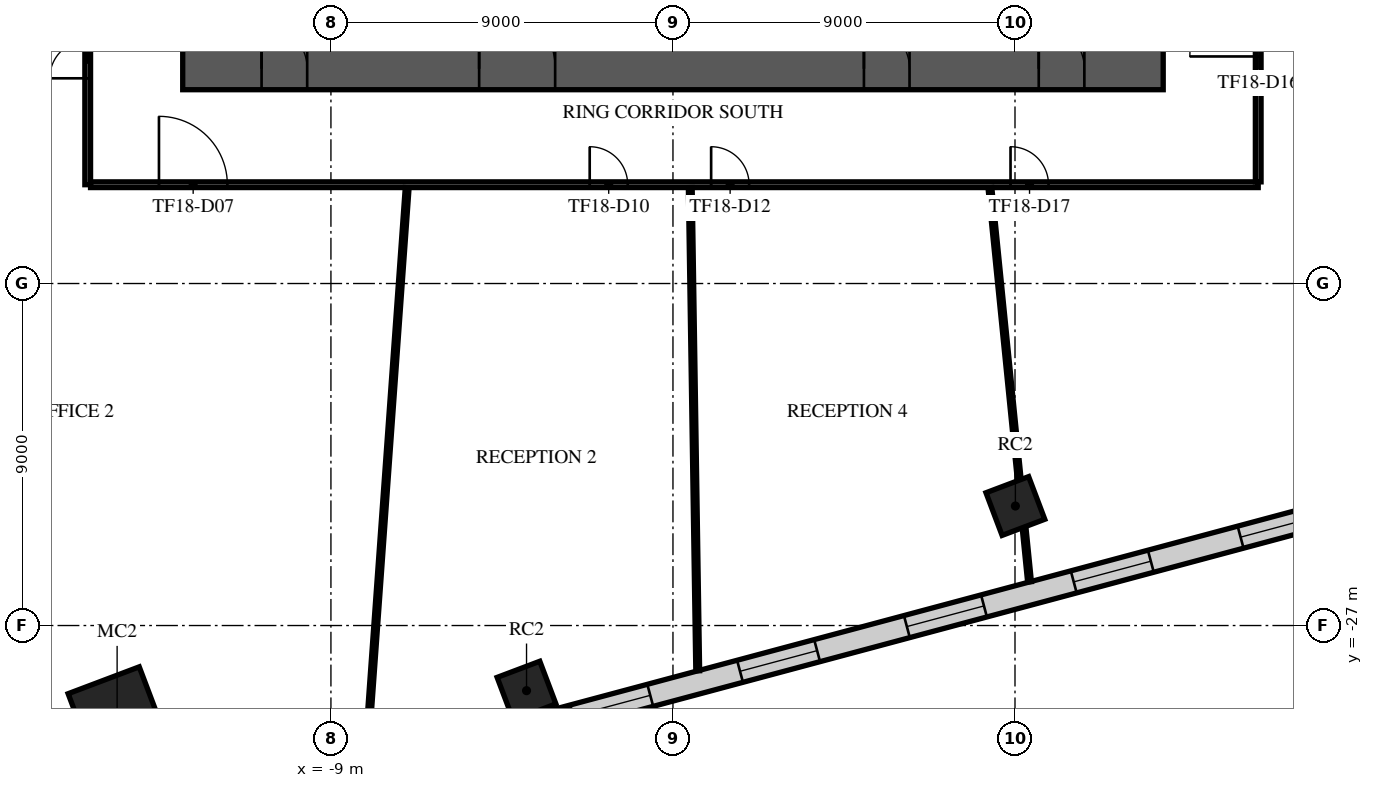
"""IFC4 building model, lengths in metres.
Left out: names, types, materials, properties, quantities, classifications, styles, units other than length and angle.
Written with IfcOpenShell. Run it as: python <this file> out.ifc"""

import sys

from ifc_helpers import new_model, si_unit, direction, frame, frame_2d, origin, origin_2d, place, context, subcontext, project, spatial, rectangle, extrude, element, fill, save


model = new_model("IFC4")
c1 = context("Model", 3, precision=1e-05, world=origin(), true_north=direction((0.0, 1.0)))
c2 = subcontext(c1, "Body", "Model", "MODEL_VIEW")
j1 = project(units=[si_unit("LENGTHUNIT", "METRE"), si_unit("PLANEANGLEUNIT", "RADIAN")], contexts=[c1])
p1 = place(None, origin())
s1 = spatial("IfcSite", under=j1, at=p1, CompositionType="ELEMENT")
p2 = place(p1, origin())
s2 = spatial("IfcBuilding", under=s1, at=p2, CompositionType="ELEMENT")
p3 = place(p2, frame((0.0, 0.0, 82.1)))
s3 = spatial("IfcBuildingStorey", under=s2, at=p3, CompositionType="ELEMENT", Elevation=82.1)
p4 = place(p3, frame((-14.626, -29.376, -0.42), z_axis=(0.0, 0.0, 1.0), x_axis=(0.935491525991, 0.353349125935, 0.0)))
e1 = element("IfcColumn", 1, at=p4, inside=s3, PredefinedType="COLUMN", context=c2, shape_type="SweptSolid", body=[
    extrude(rectangle(XDim=2.0, YDim=2.0, at=origin_2d()), origin(), (0.0, 0.0, 1.0), 4.42),
])
for number, where, z_axis, x_axis in (
    (2, (-3.853, -28.714, -0.42), (0.0, 0.0, 1.0), (0.935, 0.353, 0.0)),
    (3, (9.01, -23.855, -0.42), (0.0, 0.0, 1.0), (0.935, 0.353, 0.0)),
):
    element("IfcColumn", number, at=place(p3, frame(where, z_axis=z_axis, x_axis=x_axis)), inside=s3, PredefinedType="COLUMN", context=c2, shape_type="SweptSolid", body=[
        extrude(rectangle(XDim=1.2, YDim=1.2, at=origin_2d()), origin(), (0.0, 0.0, 1.0), 4.42),
    ])
p5 = place(p3, frame((-12.9, -12.35, 0.0), z_axis=(0.0, 0.0, 1.0), x_axis=(1.0, 0.0, 0.0)))
e4 = element("IfcWall", 4, at=p5, inside=s3, PredefinedType="SHEAR", context=c2, shape_type="SweptSolid", body=[
    extrude(rectangle(XDim=25.8, YDim=1.1, at=frame_2d((12.9, 0.0))), origin(), (0.0, 0.0, 1.0), 3.58),
])
p6 = place(p5, frame((7.8, 0.0, 0.0)))
e5 = element("IfcOpeningElement", 5, at=p6, cuts=e4, PredefinedType="OPENING", context=c2, shape_type="SweptSolid", body=[
    extrude(rectangle(XDim=2.0, YDim=2.1, at=frame_2d((1.0, 1.05))), frame((0.0, 0.56, 0.0), z_axis=(0.0, -1.0, 0.0), x_axis=(1.0, 0.0, 0.0)), (0.0, 0.0, 1.0), 1.12),
])
p7 = place(p5, frame((17.925, 0.0, 0.0)))
e6 = element("IfcOpeningElement", 6, at=p7, cuts=e4, PredefinedType="OPENING", context=c2, shape_type="SweptSolid", body=[
    extrude(rectangle(XDim=1.2, YDim=2.1, at=frame_2d((0.6, 1.05))), frame((0.0, 0.56, 0.0), z_axis=(0.0, -1.0, 0.0), x_axis=(1.0, 0.0, 0.0)), (0.0, 0.0, 1.0), 1.12),
])
p8 = place(p5, frame((2.075, 0.0, 0.0)))
e7 = element("IfcOpeningElement", 7, at=p8, cuts=e4, PredefinedType="OPENING", context=c2, shape_type="SweptSolid", body=[
    extrude(rectangle(XDim=1.2, YDim=2.1, at=frame_2d((0.6, 1.05))), frame((0.0, 0.56, 0.0), z_axis=(0.0, -1.0, 0.0), x_axis=(1.0, 0.0, 0.0)), (0.0, 0.0, 1.0), 1.12),
])
p9 = place(p5, frame((22.525, 0.0, 0.0)))
e8 = element("IfcOpeningElement", 8, at=p9, cuts=e4, PredefinedType="OPENING", context=c2, shape_type="SweptSolid", body=[
    extrude(rectangle(XDim=1.2, YDim=2.1, at=frame_2d((0.6, 1.05))), frame((0.0, 0.56, 0.0), z_axis=(0.0, -1.0, 0.0), x_axis=(1.0, 0.0, 0.0)), (0.0, 0.0, 1.0), 1.12),
])
p10 = place(p3, frame((-16.859, -33.195, 0.0), z_axis=(0.0, 0.0, 1.0), x_axis=(0.965925643605, 0.258819726887, 0.0)))
e9 = element("IfcWall", 9, at=p10, inside=s3, PredefinedType="STANDARD", context=c2, shape_type="SweptSolid", body=[
    extrude(rectangle(XDim=49.752, YDim=0.6, at=frame_2d((24.876, 0.0))), origin(), (0.0, 0.0, 1.0), 3.58),
])
p11 = place(p10, frame((1.161, 0.0, 0.9)))
e10 = element("IfcOpeningElement", 10, at=p11, cuts=e9, PredefinedType="OPENING", context=c2, shape_type="SweptSolid", body=[
    extrude(rectangle(XDim=2.1, YDim=2.1, at=frame_2d((1.05, 1.05))), frame((0.0, 0.31, 0.0), z_axis=(0.0, -1.0, 0.0), x_axis=(1.0, 0.0, 0.0)), (0.0, 0.0, 1.0), 0.62),
])
p12 = place(p10, frame((5.644, 0.0, 0.9)))
e11 = element("IfcOpeningElement", 11, at=p12, cuts=e9, PredefinedType="OPENING", context=c2, shape_type="SweptSolid", body=[
    extrude(rectangle(XDim=2.1, YDim=2.1, at=frame_2d((1.05, 1.05))), frame((0.0, 0.31, 0.0), z_axis=(0.0, -1.0, 0.0), x_axis=(1.0, 0.0, 0.0)), (0.0, 0.0, 1.0), 0.62),
])
p13 = place(p10, frame((10.189, 0.0, 0.9)))
e12 = element("IfcOpeningElement", 12, at=p13, cuts=e9, PredefinedType="OPENING", context=c2, shape_type="SweptSolid", body=[
    extrude(rectangle(XDim=2.1, YDim=2.1, at=frame_2d((1.05, 1.05))), frame((0.0, 0.31, 0.0), z_axis=(0.0, -1.0, 0.0), x_axis=(1.0, 0.0, 0.0)), (0.0, 0.0, 1.0), 0.62),
])
p14 = place(p10, frame((14.735, 0.0, 0.9)))
e13 = element("IfcOpeningElement", 13, at=p14, cuts=e9, PredefinedType="OPENING", context=c2, shape_type="SweptSolid", body=[
    extrude(rectangle(XDim=2.1, YDim=2.1, at=frame_2d((1.05, 1.05))), frame((0.0, 0.31, 0.0), z_axis=(0.0, -1.0, 0.0), x_axis=(1.0, 0.0, 0.0)), (0.0, 0.0, 1.0), 0.62),
])
p15 = place(p10, frame((19.28, 0.0, 0.9)))
e14 = element("IfcOpeningElement", 14, at=p15, cuts=e9, PredefinedType="OPENING", context=c2, shape_type="SweptSolid", body=[
    extrude(rectangle(XDim=2.1, YDim=2.1, at=frame_2d((1.05, 1.05))), frame((0.0, 0.31, 0.0), z_axis=(0.0, -1.0, 0.0), x_axis=(1.0, 0.0, 0.0)), (0.0, 0.0, 1.0), 0.62),
])
p16 = place(p10, frame((23.826, 0.0, 0.9)))
e15 = element("IfcOpeningElement", 15, at=p16, cuts=e9, PredefinedType="OPENING", context=c2, shape_type="SweptSolid", body=[
    extrude(rectangle(XDim=2.1, YDim=2.1, at=frame_2d((1.05, 1.05))), frame((0.0, 0.31, 0.0), z_axis=(0.0, -1.0, 0.0), x_axis=(1.0, 0.0, 0.0)), (0.0, 0.0, 1.0), 0.62),
])
p17 = place(p10, frame((28.371, 0.0, 0.9)))
e16 = element("IfcOpeningElement", 16, at=p17, cuts=e9, PredefinedType="OPENING", context=c2, shape_type="SweptSolid", body=[
    extrude(rectangle(XDim=2.1, YDim=2.1, at=frame_2d((1.05, 1.05))), frame((0.0, 0.31, 0.0), z_axis=(0.0, -1.0, 0.0), x_axis=(1.0, 0.0, 0.0)), (0.0, 0.0, 1.0), 0.62),
])
p18 = place(p10, frame((32.917, 0.0, 0.9)))
e17 = element("IfcOpeningElement", 17, at=p18, cuts=e9, PredefinedType="OPENING", context=c2, shape_type="SweptSolid", body=[
    extrude(rectangle(XDim=2.1, YDim=2.1, at=frame_2d((1.05, 1.05))), frame((0.0, 0.31, 0.0), z_axis=(0.0, -1.0, 0.0), x_axis=(1.0, 0.0, 0.0)), (0.0, 0.0, 1.0), 0.62),
])
p19 = place(p10, frame((37.462, 0.0, 0.9)))
e18 = element("IfcOpeningElement", 18, at=p19, cuts=e9, PredefinedType="OPENING", context=c2, shape_type="SweptSolid", body=[
    extrude(rectangle(XDim=2.1, YDim=2.1, at=frame_2d((1.05, 1.05))), frame((0.0, 0.31, 0.0), z_axis=(0.0, -1.0, 0.0), x_axis=(1.0, 0.0, 0.0)), (0.0, 0.0, 1.0), 0.62),
])
p20 = place(p10, frame((42.008, 0.0, 0.9)))
e19 = element("IfcOpeningElement", 19, at=p20, cuts=e9, PredefinedType="OPENING", context=c2, shape_type="SweptSolid", body=[
    extrude(rectangle(XDim=2.1, YDim=2.1, at=frame_2d((1.05, 1.05))), frame((0.0, 0.31, 0.0), z_axis=(0.0, -1.0, 0.0), x_axis=(1.0, 0.0, 0.0)), (0.0, 0.0, 1.0), 0.62),
])
p21 = place(p10, frame((46.491, 0.0, 0.9)))
e20 = element("IfcOpeningElement", 20, at=p21, cuts=e9, PredefinedType="OPENING", context=c2, shape_type="SweptSolid", body=[
    extrude(rectangle(XDim=2.1, YDim=2.1, at=frame_2d((1.05, 1.05))), frame((0.0, 0.31, 0.0), z_axis=(0.0, -1.0, 0.0), x_axis=(1.0, 0.0, 0.0)), (0.0, 0.0, 1.0), 0.62),
])
p22 = place(p3, frame((-15.4, -15.4, 0.0), z_axis=(0.0, 0.0, 1.0), x_axis=(0.0, 1.0, 0.0)))
e21 = element("IfcWall", 21, at=p22, inside=s3, PredefinedType="PARTITIONING", context=c2, shape_type="SweptSolid", body=[
    extrude(rectangle(XDim=30.8, YDim=0.15, at=frame_2d((15.4, 0.0))), origin(), (0.0, 0.0, 1.0), 3.08),
])
p23 = place(p22, frame((21.677, 0.0, 0.0)))
e22 = element("IfcOpeningElement", 22, at=p23, cuts=e21, PredefinedType="OPENING", context=c2, shape_type="SweptSolid", body=[
    extrude(rectangle(XDim=1.8, YDim=2.1, at=frame_2d((0.9, 1.05))), frame((0.0, 0.085, 0.0), z_axis=(0.0, -1.0, 0.0), x_axis=(1.0, 0.0, 0.0)), (0.0, 0.0, 1.0), 0.17),
])
p24 = place(p22, frame((17.927, 0.0, 0.0)))
e23 = element("IfcOpeningElement", 23, at=p24, cuts=e21, PredefinedType="OPENING", context=c2, shape_type="SweptSolid", body=[
    extrude(rectangle(XDim=1.0, YDim=2.1, at=frame_2d((0.5, 1.05))), frame((0.0, 0.085, 0.0), z_axis=(0.0, -1.0, 0.0), x_axis=(1.0, 0.0, 0.0)), (0.0, 0.0, 1.0), 0.17),
])
p25 = place(p22, frame((15.322, 0.0, 0.0)))
e24 = element("IfcOpeningElement", 24, at=p25, cuts=e21, PredefinedType="OPENING", context=c2, shape_type="SweptSolid", body=[
    extrude(rectangle(XDim=1.0, YDim=2.1, at=frame_2d((0.5, 1.05))), frame((0.0, 0.085, 0.0), z_axis=(0.0, -1.0, 0.0), x_axis=(1.0, 0.0, 0.0)), (0.0, 0.0, 1.0), 0.17),
])
p26 = place(p22, frame((6.348, 0.0, 0.0)))
e25 = element("IfcOpeningElement", 25, at=p26, cuts=e21, PredefinedType="OPENING", context=c2, shape_type="SweptSolid", body=[
    extrude(rectangle(XDim=1.0, YDim=2.1, at=frame_2d((0.5, 1.05))), frame((0.0, 0.085, 0.0), z_axis=(0.0, -1.0, 0.0), x_axis=(1.0, 0.0, 0.0)), (0.0, 0.0, 1.0), 0.17),
])
p27 = place(p22, frame((27.605, 0.0, 0.0)))
e26 = element("IfcOpeningElement", 26, at=p27, cuts=e21, PredefinedType="OPENING", context=c2, shape_type="SweptSolid", body=[
    extrude(rectangle(XDim=1.0, YDim=2.1, at=frame_2d((0.5, 1.05))), frame((0.0, 0.085, 0.0), z_axis=(0.0, -1.0, 0.0), x_axis=(1.0, 0.0, 0.0)), (0.0, 0.0, 1.0), 0.17),
])
p28 = place(p22, frame((2.8, 0.0, 0.0)))
e27 = element("IfcOpeningElement", 27, at=p28, cuts=e21, PredefinedType="OPENING", context=c2, shape_type="SweptSolid", body=[
    extrude(rectangle(XDim=1.0, YDim=2.1, at=frame_2d((0.5, 1.05))), frame((0.0, 0.085, 0.0), z_axis=(0.0, -1.0, 0.0), x_axis=(1.0, 0.0, 0.0)), (0.0, 0.0, 1.0), 0.17),
])
p29 = place(p3, frame((-15.325, -15.4, 0.0), z_axis=(0.0, 0.0, 1.0), x_axis=(1.0, 0.0, 0.0)))
e28 = element("IfcWall", 28, at=p29, inside=s3, PredefinedType="PARTITIONING", context=c2, shape_type="SweptSolid", body=[
    extrude(rectangle(XDim=30.725, YDim=0.15, at=frame_2d((15.362, 0.0))), origin(), (0.0, 0.0, 1.0), 3.08),
])
p30 = place(p29, frame((1.8, 0.0, 0.0)))
e29 = element("IfcOpeningElement", 29, at=p30, cuts=e28, PredefinedType="OPENING", context=c2, shape_type="SweptSolid", body=[
    extrude(rectangle(XDim=1.8, YDim=2.1, at=frame_2d((0.9, 1.05))), frame((0.0, 0.085, 0.0), z_axis=(0.0, -1.0, 0.0), x_axis=(1.0, 0.0, 0.0)), (0.0, 0.0, 1.0), 0.17),
])
p31 = place(p29, frame((13.134, 0.0, 0.0)))
e30 = element("IfcOpeningElement", 30, at=p31, cuts=e28, PredefinedType="OPENING", context=c2, shape_type="SweptSolid", body=[
    extrude(rectangle(XDim=1.0, YDim=2.1, at=frame_2d((0.5, 1.05))), frame((0.0, 0.085, 0.0), z_axis=(0.0, -1.0, 0.0), x_axis=(1.0, 0.0, 0.0)), (0.0, 0.0, 1.0), 0.17),
])
p32 = place(p29, frame((16.329, 0.0, 0.0)))
e31 = element("IfcOpeningElement", 31, at=p32, cuts=e28, PredefinedType="OPENING", context=c2, shape_type="SweptSolid", body=[
    extrude(rectangle(XDim=1.0, YDim=2.1, at=frame_2d((0.5, 1.05))), frame((0.0, 0.085, 0.0), z_axis=(0.0, -1.0, 0.0), x_axis=(1.0, 0.0, 0.0)), (0.0, 0.0, 1.0), 0.17),
])
p33 = place(p29, frame((24.208, 0.0, 0.0)))
e32 = element("IfcOpeningElement", 32, at=p33, cuts=e28, PredefinedType="OPENING", context=c2, shape_type="SweptSolid", body=[
    extrude(rectangle(XDim=1.0, YDim=2.1, at=frame_2d((0.5, 1.05))), frame((0.0, 0.085, 0.0), z_axis=(0.0, -1.0, 0.0), x_axis=(1.0, 0.0, 0.0)), (0.0, 0.0, 1.0), 0.17),
])
p34 = place(p3, frame((15.4, -15.325, 0.0), z_axis=(0.0, 0.0, 1.0), x_axis=(0.0, 1.0, 0.0)))
e33 = element("IfcWall", 33, at=p34, inside=s3, PredefinedType="PARTITIONING", context=c2, shape_type="SweptSolid", body=[
    extrude(rectangle(XDim=30.65, YDim=0.15, at=frame_2d((15.325, 0.0))), origin(), (0.0, 0.0, 1.0), 3.08),
])
p35 = place(p34, frame((24.14, 0.0, 0.0)))
e34 = element("IfcOpeningElement", 34, at=p35, cuts=e33, PredefinedType="OPENING", context=c2, shape_type="SweptSolid", body=[
    extrude(rectangle(XDim=1.8, YDim=2.1, at=frame_2d((0.9, 1.05))), frame((0.0, 0.085, 0.0), z_axis=(0.0, -1.0, 0.0), x_axis=(1.0, 0.0, 0.0)), (0.0, 0.0, 1.0), 0.17),
])
p36 = place(p34, frame((3.3, 0.0, 0.0)))
e35 = element("IfcOpeningElement", 35, at=p36, cuts=e33, PredefinedType="OPENING", context=c2, shape_type="SweptSolid", body=[
    extrude(rectangle(XDim=1.8, YDim=2.1, at=frame_2d((0.9, 1.05))), frame((0.0, 0.085, 0.0), z_axis=(0.0, -1.0, 0.0), x_axis=(1.0, 0.0, 0.0)), (0.0, 0.0, 1.0), 0.17),
])
p37 = place(p34, frame((19.191, 0.0, 0.0)))
e36 = element("IfcOpeningElement", 36, at=p37, cuts=e33, PredefinedType="OPENING", context=c2, shape_type="SweptSolid", body=[
    extrude(rectangle(XDim=1.0, YDim=2.1, at=frame_2d((0.5, 1.05))), frame((0.0, 0.085, 0.0), z_axis=(0.0, -1.0, 0.0), x_axis=(1.0, 0.0, 0.0)), (0.0, 0.0, 1.0), 0.17),
])
p38 = place(p34, frame((10.963, 0.0, 0.0)))
e37 = element("IfcOpeningElement", 37, at=p38, cuts=e33, PredefinedType="OPENING", context=c2, shape_type="SweptSolid", body=[
    extrude(rectangle(XDim=1.0, YDim=2.1, at=frame_2d((0.5, 1.05))), frame((0.0, 0.085, 0.0), z_axis=(0.0, -1.0, 0.0), x_axis=(1.0, 0.0, 0.0)), (0.0, 0.0, 1.0), 0.17),
])
p39 = place(p3, frame((-27.178, -12.154, 0.0), z_axis=(0.0, 0.0, 1.0), x_axis=(0.996016470741, 0.089169445512, 0.0)))
e38 = element("IfcWall", 38, at=p39, inside=s3, PredefinedType="PARTITIONING", context=c2, shape_type="SweptSolid", body=[
    extrude(rectangle(XDim=11.746, YDim=0.1, at=frame_2d((5.873, 0.0))), origin(), (0.0, 0.0, 1.0), 3.58),
])
p40 = place(p3, frame((-8.074, -30.528, 0.0), z_axis=(0.0, 0.0, 1.0), x_axis=(0.071616164184, 0.997432265885, 0.0)))
e39 = element("IfcWall", 39, at=p40, inside=s3, PredefinedType="PARTITIONING", context=c2, shape_type="SweptSolid", body=[
    extrude(rectangle(XDim=15.088, YDim=0.1, at=frame_2d((7.544, 0.0))), origin(), (0.0, 0.0, 1.0), 3.58),
])
p41 = place(p3, frame((0.455, -15.476, 0.0), z_axis=(0.0, 0.0, 1.0), x_axis=(0.015436837746, -0.999880844921, 0.0)))
e40 = element("IfcWall", 40, at=p41, inside=s3, PredefinedType="PARTITIONING", context=c2, shape_type="SweptSolid", body=[
    extrude(rectangle(XDim=12.716, YDim=0.1, at=frame_2d((6.358, 0.0))), origin(), (0.0, 0.0, 1.0), 3.58),
])
p42 = place(p3, frame((8.34, -15.48, 0.0), z_axis=(0.0, 0.0, 1.0), x_axis=(0.09998194497, -0.99498925154, 0.0)))
e41 = element("IfcWall", 41, at=p42, inside=s3, PredefinedType="PARTITIONING", context=c2, shape_type="SweptSolid", body=[
    extrude(rectangle(XDim=7.733, YDim=0.1, at=frame_2d((3.867, 0.0))), origin(), (0.0, 0.0, 1.0), 2.96),
])
p43 = place(p3, frame((9.237, -24.41, 0.0), z_axis=(0.0, 0.0, 1.0), x_axis=(0.100021406051, -0.994985285485, 0.0)))
e42 = element("IfcWall", 42, at=p43, inside=s3, PredefinedType="PARTITIONING", context=c2, shape_type="SweptSolid", body=[
    extrude(rectangle(XDim=1.448, YDim=0.1, at=frame_2d((0.724, 0.0))), origin(), (0.0, 0.0, 1.0), 3.58),
])
p44 = place(p6, origin())
e43 = element("IfcDoor", 43, at=p44, inside=s3, OperationType="SINGLE_SWING_LEFT", PredefinedType="DOOR", context=c2, shape_type="SweptSolid", body=[
    extrude(rectangle(XDim=2.0, YDim=2.1, at=frame_2d((1.0, 1.05))), frame((0.0, 0.025, 0.0), z_axis=(0.0, -1.0, 0.0), x_axis=(1.0, 0.0, 0.0)), (0.0, 0.0, 1.0), 0.05),
])
fill(e5, e43)
p45 = place(p7, origin())
e44 = element("IfcDoor", 44, at=p45, inside=s3, OperationType="SINGLE_SWING_LEFT", PredefinedType="DOOR", context=c2, shape_type="SweptSolid", body=[
    extrude(rectangle(XDim=1.2, YDim=2.1, at=frame_2d((0.6, 1.05))), frame((0.0, 0.025, 0.0), z_axis=(0.0, -1.0, 0.0), x_axis=(1.0, 0.0, 0.0)), (0.0, 0.0, 1.0), 0.05),
])
fill(e6, e44)
p46 = place(p8, origin())
e45 = element("IfcDoor", 45, at=p46, inside=s3, OperationType="SINGLE_SWING_LEFT", PredefinedType="DOOR", context=c2, shape_type="SweptSolid", body=[
    extrude(rectangle(XDim=1.2, YDim=2.1, at=frame_2d((0.6, 1.05))), frame((0.0, 0.025, 0.0), z_axis=(0.0, -1.0, 0.0), x_axis=(1.0, 0.0, 0.0)), (0.0, 0.0, 1.0), 0.05),
])
fill(e7, e45)
p47 = place(p9, origin())
e46 = element("IfcDoor", 46, at=p47, inside=s3, OperationType="SINGLE_SWING_LEFT", PredefinedType="DOOR", context=c2, shape_type="SweptSolid", body=[
    extrude(rectangle(XDim=1.2, YDim=2.1, at=frame_2d((0.6, 1.05))), frame((0.0, 0.025, 0.0), z_axis=(0.0, -1.0, 0.0), x_axis=(1.0, 0.0, 0.0)), (0.0, 0.0, 1.0), 0.05),
])
fill(e8, e46)
p48 = place(p14, origin())
e47 = element("IfcWindow", 47, at=p48, inside=s3, PartitioningType="SINGLE_PANEL", PredefinedType="WINDOW", context=c2, shape_type="SweptSolid", body=[
    extrude(rectangle(XDim=2.1, YDim=2.1, at=frame_2d((1.05, 1.05))), frame((0.0, 0.03, 0.0), z_axis=(0.0, -1.0, 0.0), x_axis=(1.0, 0.0, 0.0)), (0.0, 0.0, 1.0), 0.06),
])
fill(e13, e47)
p49 = place(p15, origin())
e48 = element("IfcWindow", 48, at=p49, inside=s3, PartitioningType="SINGLE_PANEL", PredefinedType="WINDOW", context=c2, shape_type="SweptSolid", body=[
    extrude(rectangle(XDim=2.1, YDim=2.1, at=frame_2d((1.05, 1.05))), frame((0.0, 0.03, 0.0), z_axis=(0.0, -1.0, 0.0), x_axis=(1.0, 0.0, 0.0)), (0.0, 0.0, 1.0), 0.06),
])
fill(e14, e48)
p50 = place(p16, origin())
e49 = element("IfcWindow", 49, at=p50, inside=s3, PartitioningType="SINGLE_PANEL", PredefinedType="WINDOW", context=c2, shape_type="SweptSolid", body=[
    extrude(rectangle(XDim=2.1, YDim=2.1, at=frame_2d((1.05, 1.05))), frame((0.0, 0.03, 0.0), z_axis=(0.0, -1.0, 0.0), x_axis=(1.0, 0.0, 0.0)), (0.0, 0.0, 1.0), 0.06),
])
fill(e15, e49)
p51 = place(p17, origin())
e50 = element("IfcWindow", 50, at=p51, inside=s3, PartitioningType="SINGLE_PANEL", PredefinedType="WINDOW", context=c2, shape_type="SweptSolid", body=[
    extrude(rectangle(XDim=2.1, YDim=2.1, at=frame_2d((1.05, 1.05))), frame((0.0, 0.03, 0.0), z_axis=(0.0, -1.0, 0.0), x_axis=(1.0, 0.0, 0.0)), (0.0, 0.0, 1.0), 0.06),
])
fill(e16, e50)
p52 = place(p18, origin())
e51 = element("IfcWindow", 51, at=p52, inside=s3, PartitioningType="SINGLE_PANEL", PredefinedType="WINDOW", context=c2, shape_type="SweptSolid", body=[
    extrude(rectangle(XDim=2.1, YDim=2.1, at=frame_2d((1.05, 1.05))), frame((0.0, 0.03, 0.0), z_axis=(0.0, -1.0, 0.0), x_axis=(1.0, 0.0, 0.0)), (0.0, 0.0, 1.0), 0.06),
])
fill(e17, e51)
p53 = place(p30, frame((1.8, 0.0, 0.0), z_axis=(0.0, 0.0, 1.0), x_axis=(-1.0, 0.0, 0.0)))
e52 = element("IfcDoor", 52, at=p53, inside=s3, OperationType="DOUBLE_DOOR_SINGLE_SWING", PredefinedType="DOOR", context=c2, shape_type="SweptSolid", body=[
    extrude(rectangle(XDim=1.8, YDim=2.1, at=frame_2d((0.9, 1.05))), frame((0.0, 0.025, 0.0), z_axis=(0.0, -1.0, 0.0), x_axis=(1.0, 0.0, 0.0)), (0.0, 0.0, 1.0), 0.05),
])
fill(e29, e52)
p54 = place(p28, origin())
e53 = element("IfcDoor", 53, at=p54, inside=s3, OperationType="SINGLE_SWING_LEFT", PredefinedType="DOOR", context=c2, shape_type="SweptSolid", body=[
    extrude(rectangle(XDim=1.0, YDim=2.1, at=frame_2d((0.5, 1.05))), frame((0.0, 0.025, 0.0), z_axis=(0.0, -1.0, 0.0), x_axis=(1.0, 0.0, 0.0)), (0.0, 0.0, 1.0), 0.05),
])
fill(e27, e53)
p55 = place(p31, frame((1.0, 0.0, 0.0), z_axis=(0.0, 0.0, 1.0), x_axis=(-1.0, 0.0, 0.0)))
e54 = element("IfcDoor", 54, at=p55, inside=s3, OperationType="SINGLE_SWING_LEFT", PredefinedType="DOOR", context=c2, shape_type="SweptSolid", body=[
    extrude(rectangle(XDim=1.0, YDim=2.1, at=frame_2d((0.5, 1.05))), frame((0.0, 0.025, 0.0), z_axis=(0.0, -1.0, 0.0), x_axis=(1.0, 0.0, 0.0)), (0.0, 0.0, 1.0), 0.05),
])
fill(e30, e54)
p56 = place(p32, frame((1.0, 0.0, 0.0), z_axis=(0.0, 0.0, 1.0), x_axis=(-1.0, 0.0, 0.0)))
e55 = element("IfcDoor", 55, at=p56, inside=s3, OperationType="SINGLE_SWING_RIGHT", PredefinedType="DOOR", context=c2, shape_type="SweptSolid", body=[
    extrude(rectangle(XDim=1.0, YDim=2.1, at=frame_2d((0.5, 1.05))), frame((0.0, 0.025, 0.0), z_axis=(0.0, -1.0, 0.0), x_axis=(1.0, 0.0, 0.0)), (0.0, 0.0, 1.0), 0.05),
])
fill(e31, e55)
p57 = place(p36, frame((1.8, 0.0, 0.0), z_axis=(0.0, 0.0, 1.0), x_axis=(-1.0, 0.0, 0.0)))
e56 = element("IfcDoor", 56, at=p57, inside=s3, OperationType="DOUBLE_DOOR_SINGLE_SWING", PredefinedType="DOOR", context=c2, shape_type="SweptSolid", body=[
    extrude(rectangle(XDim=1.8, YDim=2.1, at=frame_2d((0.9, 1.05))), frame((0.0, 0.025, 0.0), z_axis=(0.0, -1.0, 0.0), x_axis=(1.0, 0.0, 0.0)), (0.0, 0.0, 1.0), 0.05),
])
fill(e35, e56)
p58 = place(p33, frame((1.0, 0.0, 0.0), z_axis=(0.0, 0.0, 1.0), x_axis=(-1.0, 0.0, 0.0)))
e57 = element("IfcDoor", 57, at=p58, inside=s3, OperationType="SINGLE_SWING_LEFT", PredefinedType="DOOR", context=c2, shape_type="SweptSolid", body=[
    extrude(rectangle(XDim=1.0, YDim=2.1, at=frame_2d((0.5, 1.05))), frame((0.0, 0.025, 0.0), z_axis=(0.0, -1.0, 0.0), x_axis=(1.0, 0.0, 0.0)), (0.0, 0.0, 1.0), 0.05),
])
fill(e32, e57)
save(model, sys.argv[1])
